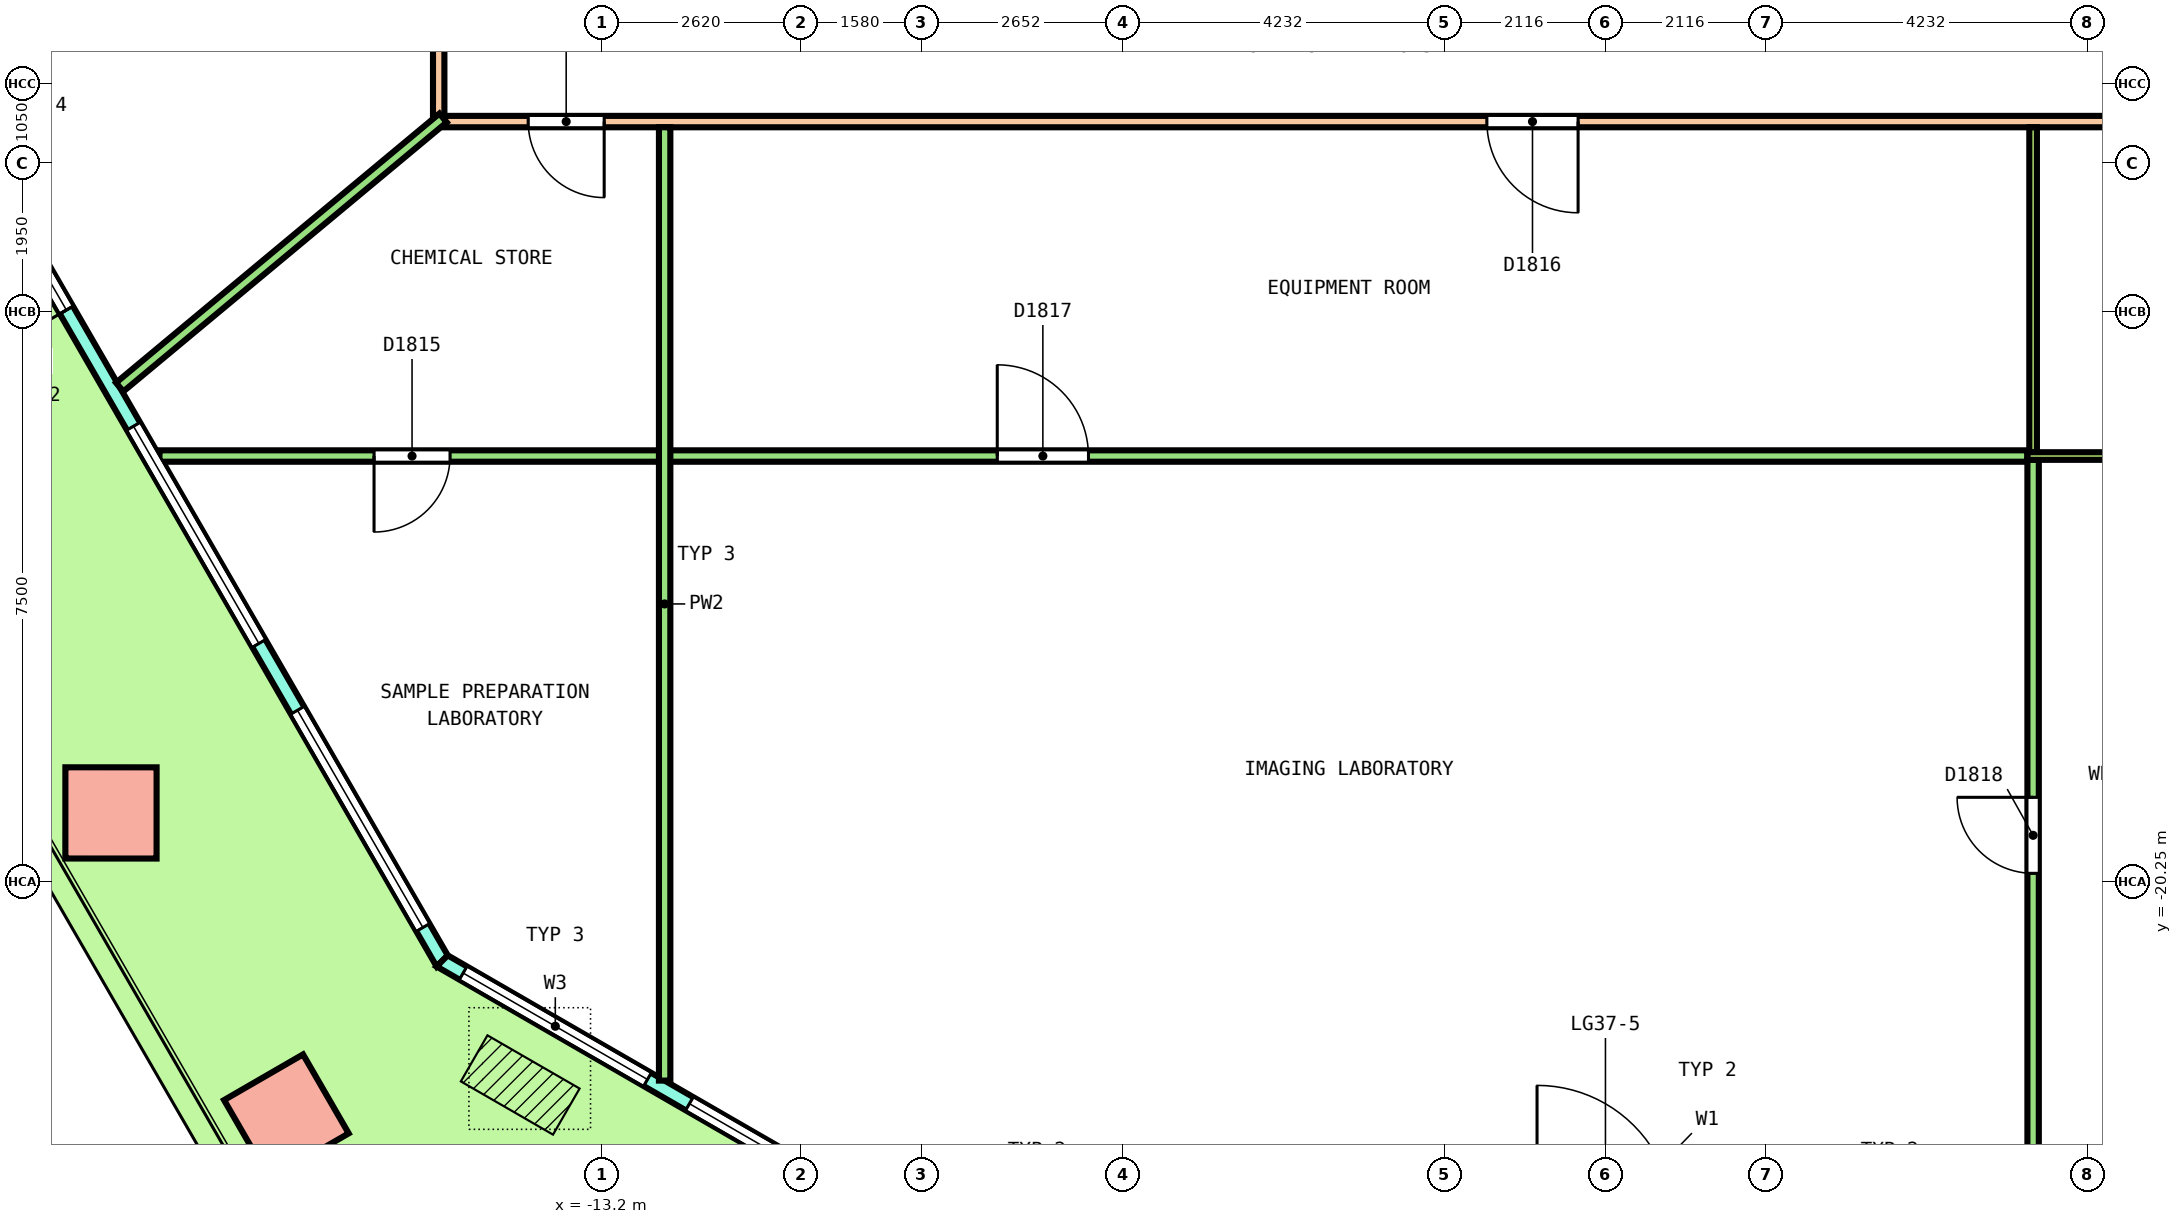
"""IFC4 building model, lengths in metres.
Left out: names, types, materials, properties, quantities, classifications, styles, units other than length and angle.
Written with IfcOpenShell. Run it as: python <this file> out.ifc"""

import sys

from ifc_helpers import new_model, si_unit, direction, frame, frame_2d, origin, origin_2d, place, context, subcontext, project, spatial, polyline, rectangle, outline, extrude, element, fill, save


model = new_model("IFC4")
c1 = context("Model", 3, precision=1e-05, world=origin(), true_north=direction((0.0, 1.0)))
c2 = subcontext(c1, "Body", "Model", "MODEL_VIEW")
j1 = project(units=[si_unit("LENGTHUNIT", "METRE"), si_unit("PLANEANGLEUNIT", "RADIAN")], contexts=[c1])
p1 = place(None, origin())
s1 = spatial("IfcSite", under=j1, at=p1, CompositionType="ELEMENT")
p2 = place(p1, origin())
s2 = spatial("IfcBuilding", under=s1, at=p2, CompositionType="ELEMENT")
p3 = place(p2, frame((0.0, 0.0, 171.6)))
s3 = spatial("IfcBuildingStorey", under=s2, at=p3, CompositionType="ELEMENT", Elevation=171.6)
p4 = place(p3, frame((-19.662, -19.345, 0.0), z_axis=(0.010908911174, -0.018864581201, 0.999762533421), x_axis=(0.500186584964, -0.865643404359, -0.021791666111)))
e1 = element("IfcColumn", 1, at=p4, inside=s3, PredefinedType="COLUMN", context=c2, shape_type="SweptSolid", body=[
    extrude(rectangle(XDim=1.2, YDim=1.2, at=origin_2d()), origin(), (0.0, 0.0, 1.0), 4.051),
])
p5 = place(p3, frame((-17.354, -23.342, 0.0), z_axis=(0.018133687401, -0.03144779011, 0.999340885723), x_axis=(0.865740951417, -0.499504633719, -0.031428107377)))
e2 = element("IfcColumn", 2, at=p5, inside=s3, PredefinedType="COLUMN", context=c2, shape_type="SweptSolid", body=[
    extrude(rectangle(XDim=1.2, YDim=1.2, at=origin_2d()), origin(), (0.0, 0.0, 1.0), 4.052),
])
p6 = place(p3, frame((-26.092, -2.608, 0.0), z_axis=(0.0, 0.0, 1.0), x_axis=(0.500001945179, -0.866024280732, 0.0)))
e3 = element("IfcWall", 3, at=p6, inside=s3, PredefinedType="SOLIDWALL", context=c2, shape_type="SweptSolid", body=[
    extrude(outline(polyline([(-0.027, -0.1), (1.003, -0.1), (2.033, -0.1), (3.063, -0.1), (4.093, -0.1), (5.123, -0.1), (6.153, -0.1), (7.183, -0.1), (8.213, -0.1), (9.243, -0.1), (10.273, -0.1), (11.302, -0.1), (12.333, -0.1), (13.363, -0.1), (14.392, -0.1), (15.422, -0.1), (16.452, -0.1), (17.482, -0.1), (18.512, -0.1), (19.542, -0.1), (20.572, -0.1), (21.602, -0.1), (21.548, 0.1), (20.523, 0.1), (19.499, 0.1), (18.474, 0.1), (17.449, 0.1), (16.424, 0.1), (15.399, 0.1), (14.375, 0.1), (13.35, 0.1), (12.325, 0.1), (11.3, 0.1), (10.275, 0.1), (9.25, 0.1), (8.226, 0.1), (7.201, 0.1), (6.176, 0.1), (5.151, 0.1), (4.126, 0.1), (3.101, 0.1), (2.076, 0.1), (1.052, 0.1), (0.027, 0.1), (-0.027, -0.1)])), origin(), (0.0, 0.0, 1.0), 4.1),
])
p7 = place(p6, frame((0.508, 0.0, 0.1)))
e4 = element("IfcOpeningElement", 4, at=p7, cuts=e3, PredefinedType="OPENING", context=c2, shape_type="SweptSolid", body=[
    extrude(rectangle(XDim=3.3, YDim=2.9, at=frame_2d((1.65, 1.45))), frame((0.0, 0.11, 0.0), z_axis=(0.0, -1.0, 0.0), x_axis=(1.0, 0.0, 0.0)), (0.0, 0.0, 1.0), 0.22),
])
p8 = place(p6, frame((4.823, 0.0, 0.1)))
e5 = element("IfcOpeningElement", 5, at=p8, cuts=e3, PredefinedType="OPENING", context=c2, shape_type="SweptSolid", body=[
    extrude(rectangle(XDim=3.3, YDim=2.9, at=frame_2d((1.65, 1.45))), frame((0.0, 0.11, 0.0), z_axis=(0.0, -1.0, 0.0), x_axis=(1.0, 0.0, 0.0)), (0.0, 0.0, 1.0), 0.22),
])
p9 = place(p6, frame((9.888, 0.0, 0.0)))
e6 = element("IfcOpeningElement", 6, at=p9, cuts=e3, PredefinedType="OPENING", context=c2, shape_type="SweptSolid", body=[
    extrude(rectangle(XDim=1.8, YDim=2.4, at=frame_2d((0.9, 1.2))), frame((0.0, 0.11, 0.0), z_axis=(0.0, -1.0, 0.0), x_axis=(1.0, 0.0, 0.0)), (0.0, 0.0, 1.0), 0.22),
])
p10 = place(p6, frame((9.888, 0.0, 2.55)))
e7 = element("IfcOpeningElement", 7, at=p10, cuts=e3, PredefinedType="OPENING", context=c2, shape_type="SweptSolid", body=[
    extrude(rectangle(XDim=1.8, YDim=0.45, at=frame_2d((0.9, 0.225))), frame((0.0, 0.11, 0.0), z_axis=(0.0, -1.0, 0.0), x_axis=(1.0, 0.0, 0.0)), (0.0, 0.0, 1.0), 0.22),
])
p11 = place(p6, frame((13.453, 0.0, 0.1)))
e8 = element("IfcOpeningElement", 8, at=p11, cuts=e3, PredefinedType="OPENING", context=c2, shape_type="SweptSolid", body=[
    extrude(rectangle(XDim=3.3, YDim=2.9, at=frame_2d((1.65, 1.45))), frame((0.0, 0.11, 0.0), z_axis=(0.0, -1.0, 0.0), x_axis=(1.0, 0.0, 0.0)), (0.0, 0.0, 1.0), 0.22),
])
p12 = place(p6, frame((17.768, 0.0, 0.1)))
e9 = element("IfcOpeningElement", 9, at=p12, cuts=e3, PredefinedType="OPENING", context=c2, shape_type="SweptSolid", body=[
    extrude(rectangle(XDim=3.3, YDim=2.9, at=frame_2d((1.65, 1.45))), frame((0.0, 0.11, 0.0), z_axis=(0.0, -1.0, 0.0), x_axis=(1.0, 0.0, 0.0)), (0.0, 0.0, 1.0), 0.22),
])
p13 = place(p3, frame((-15.304, -21.292, 0.0), z_axis=(0.0, 0.0, 1.0), x_axis=(0.866014080581, -0.50001961185, 0.0)))
e10 = element("IfcWall", 10, at=p13, inside=s3, PredefinedType="SOLIDWALL", context=c2, shape_type="SweptSolid", body=[
    extrude(outline(polyline([(-0.027, -0.1), (1.128, -0.1), (2.283, -0.1), (3.438, -0.1), (4.592, -0.1), (5.747, -0.1), (6.902, -0.1), (6.848, 0.1), (5.711, 0.1), (4.574, 0.1), (3.438, 0.1), (2.301, 0.1), (1.164, 0.1), (0.027, 0.1), (-0.027, -0.1)])), origin(), (0.0, 0.0, 1.0), 4.1),
])
p14 = place(p13, frame((0.319, 0.0, 0.1)))
e11 = element("IfcOpeningElement", 11, at=p14, cuts=e10, PredefinedType="OPENING", context=c2, shape_type="SweptSolid", body=[
    extrude(rectangle(XDim=2.8, YDim=2.9, at=frame_2d((1.4, 1.45))), frame((0.0, 0.11, 0.0), z_axis=(0.0, -1.0, 0.0), x_axis=(1.0, 0.0, 0.0)), (0.0, 0.0, 1.0), 0.22),
])
p15 = place(p13, frame((3.756, 0.0, 0.1)))
e12 = element("IfcOpeningElement", 12, at=p15, cuts=e10, PredefinedType="OPENING", context=c2, shape_type="SweptSolid", body=[
    extrude(rectangle(XDim=2.8, YDim=2.9, at=frame_2d((1.4, 1.45))), frame((0.0, 0.11, 0.0), z_axis=(0.0, -1.0, 0.0), x_axis=(1.0, 0.0, 0.0)), (0.0, 0.0, 1.0), 0.22),
])
p16 = place(p3, frame((-15.35, -10.175, 0.0), z_axis=(0.0, 0.0, 1.0), x_axis=(0.0, 1.0, 0.0)))
e13 = element("IfcWall", 13, at=p16, inside=s3, PredefinedType="PARTITIONING", context=c2, shape_type="SweptSolid", body=[
    extrude(rectangle(XDim=8.248, YDim=0.15, at=frame_2d((4.124, 0.0))), origin(), (0.0, 0.0, 1.0), 3.05),
])
p17 = place(p3, frame((-15.275, -10.25, 0.0), z_axis=(0.0, 0.0, 1.0), x_axis=(1.0, 0.0, 0.0)))
e14 = element("IfcWall", 14, at=p17, inside=s3, PredefinedType="PARTITIONING", context=c2, shape_type="SweptSolid", body=[
    extrude(rectangle(XDim=30.575, YDim=0.15, at=frame_2d((15.288, 0.0))), origin(), (0.0, 0.0, 1.0), 3.05),
])
p18 = place(p17, frame((1.102, 0.0, 0.0)))
e15 = element("IfcOpeningElement", 15, at=p18, cuts=e14, PredefinedType="OPENING", context=c2, shape_type="SweptSolid", body=[
    extrude(rectangle(XDim=1.0, YDim=2.1, at=frame_2d((0.5, 1.05))), frame((0.0, 0.085, 0.0), z_axis=(0.0, -1.0, 0.0), x_axis=(1.0, 0.0, 0.0)), (0.0, 0.0, 1.0), 0.17),
])
p19 = place(p17, frame((13.715, 0.0, 0.0)))
e16 = element("IfcOpeningElement", 16, at=p19, cuts=e14, PredefinedType="OPENING", context=c2, shape_type="SweptSolid", body=[
    extrude(rectangle(XDim=1.2, YDim=2.1, at=frame_2d((0.6, 1.05))), frame((0.0, 0.085, 0.0), z_axis=(0.0, -1.0, 0.0), x_axis=(1.0, 0.0, 0.0)), (0.0, 0.0, 1.0), 0.17),
])
p20 = place(p17, frame((22.585, 0.0, 0.0)))
e17 = element("IfcOpeningElement", 17, at=p20, cuts=e14, PredefinedType="OPENING", context=c2, shape_type="SweptSolid", body=[
    extrude(rectangle(XDim=1.0, YDim=2.1, at=frame_2d((0.5, 1.05))), frame((0.0, 0.085, 0.0), z_axis=(0.0, -1.0, 0.0), x_axis=(1.0, 0.0, 0.0)), (0.0, 0.0, 1.0), 0.17),
])
p21 = place(p17, frame((28.207, 0.0, 0.0)))
e18 = element("IfcOpeningElement", 18, at=p21, cuts=e14, PredefinedType="OPENING", context=c2, shape_type="SweptSolid", body=[
    extrude(rectangle(XDim=1.0, YDim=2.1, at=frame_2d((0.5, 1.05))), frame((0.0, 0.085, 0.0), z_axis=(0.0, -1.0, 0.0), x_axis=(1.0, 0.0, 0.0)), (0.0, 0.0, 1.0), 0.17),
])
p22 = place(p3, frame((-19.547, -13.743, 0.0), z_axis=(0.0, 0.0, 1.0), x_axis=(0.768579042723, 0.639754839831, 0.0)))
e19 = element("IfcWall", 19, at=p22, inside=s3, PredefinedType="PARTITIONING", context=c2, shape_type="SweptSolid", body=[
    extrude(rectangle(XDim=5.536, YDim=0.15, at=frame_2d((2.768, 0.0))), origin(), (0.0, 0.0, 1.0), 3.05),
])
p23 = place(p3, frame((-19.024, -14.65, 0.0), z_axis=(0.0, 0.0, 1.0), x_axis=(1.0, 0.0, 0.0)))
e20 = element("IfcWall", 20, at=p23, inside=s3, PredefinedType="PARTITIONING", context=c2, shape_type="SweptSolid", body=[
    extrude(rectangle(XDim=24.575, YDim=0.15, at=frame_2d((12.288, 0.0))), origin(), (0.0, 0.0, 1.0), 3.05),
])
p24 = place(p23, frame((2.823, 0.0, 0.0)))
e21 = element("IfcOpeningElement", 21, at=p24, cuts=e20, PredefinedType="OPENING", context=c2, shape_type="SweptSolid", body=[
    extrude(rectangle(XDim=1.0, YDim=2.1, at=frame_2d((0.5, 1.05))), frame((0.0, 0.085, 0.0), z_axis=(0.0, -1.0, 0.0), x_axis=(1.0, 0.0, 0.0)), (0.0, 0.0, 1.0), 0.17),
])
p25 = place(p23, frame((11.022, 0.0, 0.0)))
e22 = element("IfcOpeningElement", 22, at=p25, cuts=e20, PredefinedType="OPENING", context=c2, shape_type="SweptSolid", body=[
    extrude(rectangle(XDim=1.2, YDim=2.1, at=frame_2d((0.6, 1.05))), frame((0.0, 0.085, 0.0), z_axis=(0.0, -1.0, 0.0), x_axis=(1.0, 0.0, 0.0)), (0.0, 0.0, 1.0), 0.17),
])
p26 = place(p3, frame((-12.377, -22.867, 0.0), z_axis=(0.0, 0.0, 1.0), x_axis=(0.0, 1.0, 0.0)))
e23 = element("IfcWall", 23, at=p26, inside=s3, PredefinedType="PARTITIONING", context=c2, shape_type="SweptSolid", body=[
    extrude(rectangle(XDim=12.542, YDim=0.15, at=frame_2d((6.271, 0.0))), origin(), (0.0, 0.0, 1.0), 3.05),
])
p27 = place(p3, frame((5.626, -24.63, 0.0), z_axis=(0.0, 0.0, 1.0), x_axis=(0.0, 1.0, 0.0)))
e24 = element("IfcWall", 24, at=p27, inside=s3, PredefinedType="PARTITIONING", context=c2, shape_type="SweptSolid", body=[
    extrude(rectangle(XDim=9.93, YDim=0.15, at=frame_2d((4.965, 0.0))), origin(), (0.0, 0.0, 1.0), 3.05),
])
p28 = place(p27, frame((4.49, 0.0, 0.0)))
e25 = element("IfcOpeningElement", 25, at=p28, cuts=e24, PredefinedType="OPENING", context=c2, shape_type="SweptSolid", body=[
    extrude(rectangle(XDim=1.0, YDim=2.1, at=frame_2d((0.5, 1.05))), frame((0.0, 0.085, 0.0), z_axis=(0.0, -1.0, 0.0), x_axis=(1.0, 0.0, 0.0)), (0.0, 0.0, 1.0), 0.17),
])
p29 = place(p3, frame((5.626, -14.6, 0.0), z_axis=(0.0, 0.0, 1.0), x_axis=(0.0, 1.0, 0.0)))
e26 = element("IfcWall", 26, at=p29, inside=s3, PredefinedType="PARTITIONING", context=c2, shape_type="SweptSolid", body=[
    extrude(rectangle(XDim=4.275, YDim=0.1, at=frame_2d((2.138, 0.0))), origin(), (0.0, 0.0, 1.0), 3.05),
])
p30 = place(p3, frame((5.552, -14.65, 0.0), z_axis=(0.0, 0.0, 1.0), x_axis=(1.0, 0.0, 0.0)))
e27 = element("IfcWall", 27, at=p30, inside=s3, PredefinedType="PARTITIONING", context=c2, shape_type="SweptSolid", body=[
    extrude(rectangle(XDim=3.776, YDim=0.1, at=frame_2d((1.888, 0.0))), origin(), (0.0, 0.0, 1.0), 3.05),
])
p31 = place(p9, origin())
e28 = element("IfcDoor", 28, at=p31, inside=s3, OperationType="DOUBLE_DOOR_SINGLE_SWING", PredefinedType="DOOR", context=c2, shape_type="SweptSolid", body=[
    extrude(rectangle(XDim=1.8, YDim=2.4, at=frame_2d((0.9, 1.2))), frame((0.0, 0.025, 0.0), z_axis=(0.0, -1.0, 0.0), x_axis=(1.0, 0.0, 0.0)), (0.0, 0.0, 1.0), 0.05),
])
fill(e6, e28)
p32 = place(p10, origin())
e29 = element("IfcWindow", 29, at=p32, inside=s3, PartitioningType="SINGLE_PANEL", PredefinedType="WINDOW", context=c2, shape_type="SweptSolid", body=[
    extrude(rectangle(XDim=1.8, YDim=0.45, at=frame_2d((0.9, 0.225))), frame((0.0, 0.03, 0.0), z_axis=(0.0, -1.0, 0.0), x_axis=(1.0, 0.0, 0.0)), (0.0, 0.0, 1.0), 0.06),
])
fill(e7, e29)
p33 = place(p11, origin())
e30 = element("IfcWindow", 30, at=p33, inside=s3, PartitioningType="SINGLE_PANEL", PredefinedType="WINDOW", context=c2, shape_type="SweptSolid", body=[
    extrude(rectangle(XDim=3.3, YDim=2.9, at=frame_2d((1.65, 1.45))), frame((0.0, 0.03, 0.0), z_axis=(0.0, -1.0, 0.0), x_axis=(1.0, 0.0, 0.0)), (0.0, 0.0, 1.0), 0.06),
])
fill(e8, e30)
p34 = place(p12, origin())
e31 = element("IfcWindow", 31, at=p34, inside=s3, PartitioningType="SINGLE_PANEL", PredefinedType="WINDOW", context=c2, shape_type="SweptSolid", body=[
    extrude(rectangle(XDim=3.3, YDim=2.9, at=frame_2d((1.65, 1.45))), frame((0.0, 0.03, 0.0), z_axis=(0.0, -1.0, 0.0), x_axis=(1.0, 0.0, 0.0)), (0.0, 0.0, 1.0), 0.06),
])
fill(e9, e31)
p35 = place(p14, origin())
e32 = element("IfcWindow", 32, at=p35, inside=s3, PartitioningType="SINGLE_PANEL", PredefinedType="WINDOW", context=c2, shape_type="SweptSolid", body=[
    extrude(rectangle(XDim=2.8, YDim=2.9, at=frame_2d((1.4, 1.45))), frame((0.0, 0.03, 0.0), z_axis=(0.0, -1.0, 0.0), x_axis=(1.0, 0.0, 0.0)), (0.0, 0.0, 1.0), 0.06),
])
fill(e11, e32)
p36 = place(p15, origin())
e33 = element("IfcWindow", 33, at=p36, inside=s3, PartitioningType="SINGLE_PANEL", PredefinedType="WINDOW", context=c2, shape_type="SweptSolid", body=[
    extrude(rectangle(XDim=2.8, YDim=2.9, at=frame_2d((1.4, 1.45))), frame((0.0, 0.03, 0.0), z_axis=(0.0, -1.0, 0.0), x_axis=(1.0, 0.0, 0.0)), (0.0, 0.0, 1.0), 0.06),
])
fill(e12, e33)
p37 = place(p18, origin())
e34 = element("IfcDoor", 34, at=p37, inside=s3, OperationType="SINGLE_SWING_LEFT", PredefinedType="DOOR", context=c2, shape_type="SweptSolid", body=[
    extrude(rectangle(XDim=1.0, YDim=2.1, at=frame_2d((0.5, 1.05))), frame((0.0, 0.025, 0.0), z_axis=(0.0, -1.0, 0.0), x_axis=(1.0, 0.0, 0.0)), (0.0, 0.0, 1.0), 0.05),
])
fill(e15, e34)
p38 = place(p24, origin())
e35 = element("IfcDoor", 35, at=p38, inside=s3, OperationType="SINGLE_SWING_RIGHT", PredefinedType="DOOR", context=c2, shape_type="SweptSolid", body=[
    extrude(rectangle(XDim=1.0, YDim=2.1, at=frame_2d((0.5, 1.05))), frame((0.0, 0.025, 0.0), z_axis=(0.0, -1.0, 0.0), x_axis=(1.0, 0.0, 0.0)), (0.0, 0.0, 1.0), 0.05),
])
fill(e21, e35)
p39 = place(p19, origin())
e36 = element("IfcDoor", 36, at=p39, inside=s3, OperationType="DOUBLE_DOOR_SINGLE_SWING", PredefinedType="DOOR", context=c2, shape_type="SweptSolid", body=[
    extrude(rectangle(XDim=1.2, YDim=2.1, at=frame_2d((0.6, 1.05))), frame((0.0, 0.025, 0.0), z_axis=(0.0, -1.0, 0.0), x_axis=(1.0, 0.0, 0.0)), (0.0, 0.0, 1.0), 0.05),
])
fill(e16, e36)
p40 = place(p25, origin())
e37 = element("IfcDoor", 37, at=p40, inside=s3, OperationType="DOUBLE_DOOR_SINGLE_SWING", PredefinedType="DOOR", context=c2, shape_type="SweptSolid", body=[
    extrude(rectangle(XDim=1.2, YDim=2.1, at=frame_2d((0.6, 1.05))), frame((0.0, 0.025, 0.0), z_axis=(0.0, -1.0, 0.0), x_axis=(1.0, 0.0, 0.0)), (0.0, 0.0, 1.0), 0.05),
])
fill(e22, e37)
p41 = place(p28, origin())
e38 = element("IfcDoor", 38, at=p41, inside=s3, OperationType="SINGLE_SWING_RIGHT", PredefinedType="DOOR", context=c2, shape_type="SweptSolid", body=[
    extrude(rectangle(XDim=1.0, YDim=2.1, at=frame_2d((0.5, 1.05))), frame((0.0, 0.025, 0.0), z_axis=(0.0, -1.0, 0.0), x_axis=(1.0, 0.0, 0.0)), (0.0, 0.0, 1.0), 0.05),
])
fill(e25, e38)
save(model, sys.argv[1])
